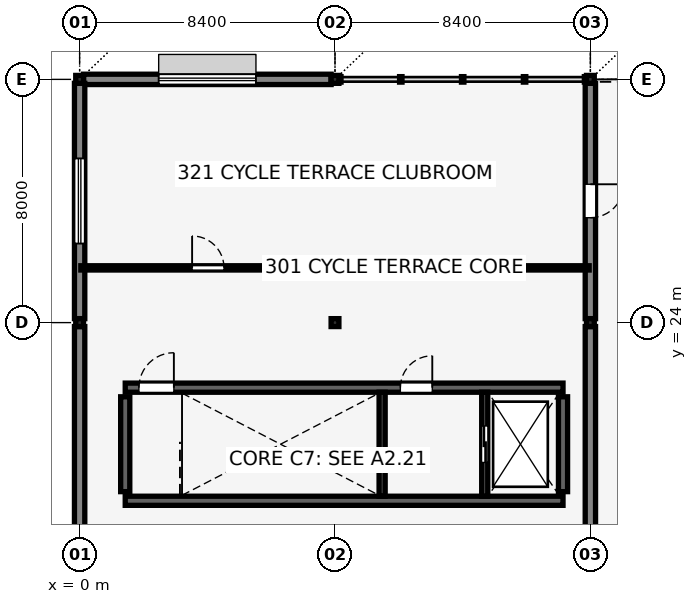
"""IFC4 building model, lengths in metres.
Left out: names, types, materials, properties, quantities, classifications, styles, units other than length and angle.
Written with IfcOpenShell. Run it as: python <this file> out.ifc"""

import sys

from ifc_helpers import new_model, si_unit, direction, frame, frame_2d, origin, origin_2d, place, context, subcontext, project, spatial, rectangle, i_section, extrude, element, fill, save


model = new_model("IFC4")
c1 = context("Model", 3, precision=1e-05, world=origin(), true_north=direction((0.0, 1.0)))
c2 = subcontext(c1, "Body", "Model", "MODEL_VIEW")
j1 = project(units=[si_unit("LENGTHUNIT", "METRE"), si_unit("PLANEANGLEUNIT", "RADIAN")], contexts=[c1])
p1 = place(None, origin())
s1 = spatial("IfcSite", under=j1, at=p1, CompositionType="ELEMENT")
p2 = place(p1, origin())
s2 = spatial("IfcBuilding", under=s1, at=p2, CompositionType="ELEMENT")
p3 = place(p2, frame((0.0, 0.0, 13.36)))
s3 = spatial("IfcBuildingStorey", under=s2, at=p3, CompositionType="ELEMENT", Elevation=13.36)
p4 = place(p3, frame((1.5, 18.14, 0.0), z_axis=(0.0, 0.0, 1.0), x_axis=(1.0, 0.0, 0.0)))
e1 = element("IfcWall", 1, at=p4, inside=s3, PredefinedType="SHEAR", context=c2, shape_type="SweptSolid", body=[
    extrude(rectangle(XDim=14.4, YDim=0.3, at=frame_2d((7.2, 0.0))), origin(), (0.0, 0.0, 1.0), 3.58),
])
p5 = place(p3, frame((1.5, 21.86, 0.0), z_axis=(0.0, 0.0, 1.0), x_axis=(1.0, 0.0, 0.0)))
e2 = element("IfcWall", 2, at=p5, inside=s3, PredefinedType="SHEAR", context=c2, shape_type="SweptSolid", body=[
    extrude(rectangle(XDim=14.4, YDim=0.3, at=frame_2d((7.2, 0.0))), origin(), (0.0, 0.0, 1.0), 3.58),
])
p6 = place(p5, frame((0.45, 0.0, 0.0), z_axis=(0.0, 0.0, 1.0), x_axis=(1.0, 0.0, 0.0)))
e3 = element("IfcOpeningElement", 3, at=p6, cuts=e2, PredefinedType="OPENING", context=c2, shape_type="SweptSolid", body=[
    extrude(rectangle(XDim=1.15, YDim=2.15, at=frame_2d((0.575, 1.075))), frame((0.0, 0.16, 0.0), z_axis=(0.0, -1.0, 0.0), x_axis=(1.0, 0.0, 0.0)), (0.0, 0.0, 1.0), 0.32),
])
p7 = place(p5, frame((9.05, 0.0, 0.0), z_axis=(0.0, 0.0, 1.0), x_axis=(1.0, 0.0, 0.0)))
e4 = element("IfcOpeningElement", 4, at=p7, cuts=e2, PredefinedType="OPENING", context=c2, shape_type="SweptSolid", body=[
    extrude(rectangle(XDim=1.05, YDim=2.15, at=frame_2d((0.525, 1.075))), frame((0.0, 0.16, 0.0), z_axis=(0.0, -1.0, 0.0), x_axis=(1.0, 0.0, 0.0)), (0.0, 0.0, 1.0), 0.32),
])
for number, where, z_axis, x_axis in (
    (5, (1.5, 18.44, 0.0), (0.0, 0.0, 1.0), (0.0, 1.0, 0.0)),
    (6, (15.9, 18.44, 0.0), (0.0, 0.0, 1.0), (0.0, 1.0, 0.0)),
):
    element("IfcWall", number, at=place(p3, frame(where, z_axis=z_axis, x_axis=x_axis)), inside=s3, PredefinedType="SHEAR", context=c2, shape_type="SweptSolid", body=[
        extrude(rectangle(XDim=3.12, YDim=0.3, at=frame_2d((1.56, 0.0))), origin(), (0.0, 0.0, 1.0), 3.58),
    ])
for number, where, z_axis, x_axis in (
    (7, (0.0, 24.0, 0.0), (0.0, 0.0, 1.0), (1.0, 0.0, 0.0)),
    (8, (0.0, 32.0, 0.0), (0.0, 0.0, 1.0), (1.0, 0.0, 0.0)),
    (9, (8.4, 24.0, 0.0), (0.0, 0.0, 1.0), (1.0, 0.0, 0.0)),
    (10, (8.4, 32.0, 0.0), (0.0, 0.0, 1.0), (1.0, 0.0, 0.0)),
    (11, (16.8, 24.0, 0.0), (0.0, 0.0, 1.0), (1.0, 0.0, 0.0)),
    (12, (16.8, 32.0, 0.0), (0.0, 0.0, 1.0), (1.0, 0.0, 0.0)),
):
    element("IfcColumn", number, at=place(p3, frame(where, z_axis=z_axis, x_axis=x_axis)), inside=s3, PredefinedType="COLUMN", context=c2, shape_type="SweptSolid", body=[
        extrude(i_section(OverallWidth=0.256, OverallDepth=0.26, WebThickness=0.01, FlangeThickness=0.017, FilletRadius=0.013, at=origin_2d()), origin(), (0.0, 0.0, 1.0), 3.58),
    ])
p8 = place(p3, frame((0.128, 32.0, 0.0), z_axis=(0.0, 0.0, 1.0), x_axis=(1.0, 0.0, 0.0)))
e13 = element("IfcWall", 13, at=p8, inside=s3, PredefinedType="SOLIDWALL", context=c2, shape_type="SweptSolid", body=[
    extrude(rectangle(XDim=8.144, YDim=0.34, at=frame_2d((4.072, 0.0))), origin(), (0.0, 0.0, 1.0), 3.28),
])
p9 = place(p8, frame((2.472, 0.0, 0.9), z_axis=(0.0, 0.0, 1.0), x_axis=(1.0, 0.0, 0.0)))
e14 = element("IfcOpeningElement", 14, at=p9, cuts=e13, PredefinedType="OPENING", context=c2, shape_type="SweptSolid", body=[
    extrude(rectangle(XDim=3.2, YDim=1.65, at=frame_2d((1.6, 0.825))), frame((0.0, 0.18, 0.0), z_axis=(0.0, -1.0, 0.0), x_axis=(1.0, 0.0, 0.0)), (0.0, 0.0, 1.0), 0.36),
])
p10 = place(p3, frame((16.8, 16.13, 0.0), z_axis=(0.0, 0.0, 1.0), x_axis=(0.0, 1.0, 0.0)))
e15 = element("IfcWall", 15, at=p10, inside=s3, PredefinedType="SOLIDWALL", context=c2, shape_type="SweptSolid", body=[
    extrude(rectangle(XDim=7.74, YDim=0.34, at=frame_2d((3.87, 0.0))), origin(), (0.0, 0.0, 1.0), 3.28),
])
p11 = place(p3, frame((16.8, 24.13, 0.0), z_axis=(0.0, 0.0, 1.0), x_axis=(0.0, 1.0, 0.0)))
e16 = element("IfcWall", 16, at=p11, inside=s3, PredefinedType="SOLIDWALL", context=c2, shape_type="SweptSolid", body=[
    extrude(rectangle(XDim=7.74, YDim=0.34, at=frame_2d((3.87, 0.0))), origin(), (0.0, 0.0, 1.0), 3.28),
])
p12 = place(p11, frame((4.42, 0.0, 0.0), z_axis=(0.0, 0.0, 1.0), x_axis=(-1.0, 0.0, 0.0)))
e17 = element("IfcOpeningElement", 17, at=p12, cuts=e16, PredefinedType="OPENING", context=c2, shape_type="SweptSolid", body=[
    extrude(rectangle(XDim=1.1, YDim=2.15, at=frame_2d((0.55, 1.075))), frame((0.0, 0.18, 0.0), z_axis=(0.0, -1.0, 0.0), x_axis=(1.0, 0.0, 0.0)), (0.0, 0.0, 1.0), 0.36),
])
p13 = place(p3, frame((0.0, 16.13, 0.0), z_axis=(0.0, 0.0, 1.0), x_axis=(0.0, 1.0, 0.0)))
e18 = element("IfcWall", 18, at=p13, inside=s3, PredefinedType="SOLIDWALL", context=c2, shape_type="SweptSolid", body=[
    extrude(rectangle(XDim=7.74, YDim=0.34, at=frame_2d((3.87, 0.0))), origin(), (0.0, 0.0, 1.0), 3.28),
])
p14 = place(p3, frame((0.0, 24.13, 0.0), z_axis=(0.0, 0.0, 1.0), x_axis=(0.0, 1.0, 0.0)))
e19 = element("IfcWall", 19, at=p14, inside=s3, PredefinedType="SOLIDWALL", context=c2, shape_type="SweptSolid", body=[
    extrude(rectangle(XDim=7.74, YDim=0.34, at=frame_2d((3.87, 0.0))), origin(), (0.0, 0.0, 1.0), 3.28),
])
p15 = place(p14, frame((2.47, 0.0, 0.9), z_axis=(0.0, 0.0, 1.0), x_axis=(1.0, 0.0, 0.0)))
e20 = element("IfcOpeningElement", 20, at=p15, cuts=e19, PredefinedType="OPENING", context=c2, shape_type="SweptSolid", body=[
    extrude(rectangle(XDim=2.8, YDim=1.6, at=frame_2d((1.4, 0.8))), frame((0.0, 0.18, 0.0), z_axis=(0.0, -1.0, 0.0), x_axis=(1.0, 0.0, 0.0)), (0.0, 0.0, 1.0), 0.36),
])
p16 = place(p3, frame((9.95, 18.29, 0.0), z_axis=(0.0, 0.0, 1.0), x_axis=(0.0, 1.0, 0.0)))
e21 = element("IfcWall", 21, at=p16, inside=s3, PredefinedType="SHEAR", context=c2, shape_type="SweptSolid", body=[
    extrude(rectangle(XDim=3.42, YDim=0.2, at=frame_2d((1.71, 0.0))), origin(), (0.0, 0.0, 1.0), 3.58),
])
p17 = place(p3, frame((13.325, 18.29, 0.0), z_axis=(0.0, 0.0, 1.0), x_axis=(0.0, 1.0, 0.0)))
e22 = element("IfcWall", 22, at=p17, inside=s3, PredefinedType="SHEAR", context=c2, shape_type="SweptSolid", body=[
    extrude(rectangle(XDim=3.42, YDim=0.2, at=frame_2d((1.71, 0.0))), origin(), (0.0, 0.0, 1.0), 3.58),
])
p18 = place(p17, frame((1.11, 0.0, 0.0), z_axis=(0.0, 0.0, 1.0), x_axis=(1.0, 0.0, 0.0)))
e23 = element("IfcOpeningElement", 23, at=p18, cuts=e22, PredefinedType="OPENING", context=c2, shape_type="SweptSolid", body=[
    extrude(rectangle(XDim=1.2, YDim=2.2, at=frame_2d((0.6, 1.1))), frame((0.0, 0.11, 0.0), z_axis=(0.0, -1.0, 0.0), x_axis=(1.0, 0.0, 0.0)), (0.0, 0.0, 1.0), 0.22),
])
p19 = place(p3, frame((0.04, 25.8, 0.0), z_axis=(0.0, 0.0, 1.0), x_axis=(1.0, 0.0, 0.0)))
e24 = element("IfcWall", 24, at=p19, inside=s3, PredefinedType="PARTITIONING", context=c2, shape_type="SweptSolid", body=[
    extrude(rectangle(XDim=16.72, YDim=0.14, at=frame_2d((8.36, 0.0))), origin(), (0.0, 0.0, 1.0), 3.126),
])
p20 = place(p19, frame((3.66, 0.0, 0.0), z_axis=(0.0, 0.0, 1.0), x_axis=(1.0, 0.0, 0.0)))
e25 = element("IfcOpeningElement", 25, at=p20, cuts=e24, PredefinedType="OPENING", context=c2, shape_type="SweptSolid", body=[
    extrude(rectangle(XDim=1.05, YDim=2.15, at=frame_2d((0.525, 1.075))), frame((0.0, 0.08, 0.0), z_axis=(0.0, -1.0, 0.0), x_axis=(1.0, 0.0, 0.0)), (0.0, 0.0, 1.0), 0.16),
])
p21 = place(p9, origin())
e26 = element("IfcWindow", 26, at=p21, inside=s3, PartitioningType="TRIPLE_PANEL_VERTICAL", PredefinedType="WINDOW", context=c2, shape_type="SweptSolid", body=[
    extrude(rectangle(XDim=3.2, YDim=1.65, at=frame_2d((1.6, 0.825))), frame((0.0, 0.03, 0.0), z_axis=(0.0, -1.0, 0.0), x_axis=(1.0, 0.0, 0.0)), (0.0, 0.0, 1.0), 0.06),
])
fill(e14, e26)
p22 = place(p12, origin())
e27 = element("IfcDoor", 27, at=p22, inside=s3, OperationType="SINGLE_SWING_LEFT", PredefinedType="DOOR", context=c2, shape_type="SweptSolid", body=[
    extrude(rectangle(XDim=1.1, YDim=2.15, at=frame_2d((0.55, 1.075))), frame((0.0, 0.025, 0.0), z_axis=(0.0, -1.0, 0.0), x_axis=(1.0, 0.0, 0.0)), (0.0, 0.0, 1.0), 0.05),
])
fill(e17, e27)
p23 = place(p15, origin())
e28 = element("IfcWindow", 28, at=p23, inside=s3, PartitioningType="DOUBLE_PANEL_VERTICAL", PredefinedType="WINDOW", context=c2, shape_type="SweptSolid", body=[
    extrude(rectangle(XDim=2.8, YDim=1.6, at=frame_2d((1.4, 0.8))), frame((0.0, 0.03, 0.0), z_axis=(0.0, -1.0, 0.0), x_axis=(1.0, 0.0, 0.0)), (0.0, 0.0, 1.0), 0.06),
])
fill(e20, e28)
p24 = place(p6, origin())
e29 = element("IfcDoor", 29, at=p24, inside=s3, OperationType="SINGLE_SWING_RIGHT", PredefinedType="DOOR", context=c2, shape_type="SweptSolid", body=[
    extrude(rectangle(XDim=1.15, YDim=2.15, at=frame_2d((0.575, 1.075))), frame((0.0, 0.025, 0.0), z_axis=(0.0, -1.0, 0.0), x_axis=(1.0, 0.0, 0.0)), (0.0, 0.0, 1.0), 0.05),
])
fill(e3, e29)
p25 = place(p7, origin())
e30 = element("IfcDoor", 30, at=p25, inside=s3, OperationType="SINGLE_SWING_RIGHT", PredefinedType="DOOR", context=c2, shape_type="SweptSolid", body=[
    extrude(rectangle(XDim=1.05, YDim=2.15, at=frame_2d((0.525, 1.075))), frame((0.0, 0.025, 0.0), z_axis=(0.0, -1.0, 0.0), x_axis=(1.0, 0.0, 0.0)), (0.0, 0.0, 1.0), 0.05),
])
fill(e4, e30)
p26 = place(p18, origin())
e31 = element("IfcDoor", 31, at=p26, inside=s3, OperationType="DOUBLE_DOOR_SLIDING", PredefinedType="DOOR", context=c2, shape_type="SweptSolid", body=[
    extrude(rectangle(XDim=1.2, YDim=2.2, at=frame_2d((0.6, 1.1))), frame((0.0, 0.025, 0.0), z_axis=(0.0, -1.0, 0.0), x_axis=(1.0, 0.0, 0.0)), (0.0, 0.0, 1.0), 0.05),
])
fill(e23, e31)
p27 = place(p20, origin())
e32 = element("IfcDoor", 32, at=p27, inside=s3, OperationType="SINGLE_SWING_LEFT", PredefinedType="DOOR", context=c2, shape_type="SweptSolid", body=[
    extrude(rectangle(XDim=1.05, YDim=2.15, at=frame_2d((0.525, 1.075))), frame((0.0, 0.025, 0.0), z_axis=(0.0, -1.0, 0.0), x_axis=(1.0, 0.0, 0.0)), (0.0, 0.0, 1.0), 0.05),
])
fill(e25, e32)
save(model, sys.argv[1])
